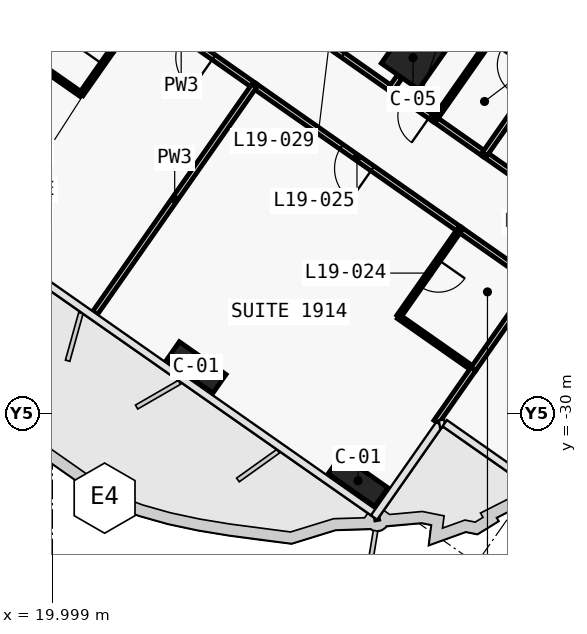
"""IFC4 building model, lengths in metres.
Left out: names, types, materials, properties, quantities, classifications, styles, units other than length and angle.
Written with IfcOpenShell. Run it as: python <this file> out.ifc"""

import sys

from ifc_helpers import new_model, si_unit, direction, frame, frame_2d, origin, origin_2d, place, context, subcontext, project, spatial, rectangle, extrude, element, fill, save


model = new_model("IFC4")
c1 = context("Model", 3, precision=1e-05, world=origin(), true_north=direction((0.0, 1.0)))
c2 = subcontext(c1, "Body", "Model", "MODEL_VIEW")
j1 = project(units=[si_unit("LENGTHUNIT", "METRE"), si_unit("PLANEANGLEUNIT", "RADIAN")], contexts=[c1])
p1 = place(None, origin())
s1 = spatial("IfcSite", under=j1, at=p1, CompositionType="ELEMENT")
p2 = place(p1, origin())
s2 = spatial("IfcBuilding", under=s1, at=p2, CompositionType="ELEMENT")
p3 = place(p2, frame((0.0, 0.0, 94.1)))
s3 = spatial("IfcBuildingStorey", under=s2, at=p3, CompositionType="ELEMENT", Elevation=94.1)
for number, where, z_axis, x_axis in (
    (1, (23.782, -28.799, 0.0), (0.0, 0.0, 1.0), (0.819, -0.574, 0.0)),
    (2, (28.042, -31.782, 0.0), (0.0, 0.0, 1.0), (0.819, -0.574, 0.0)),
):
    element("IfcColumn", number, at=place(p3, frame(where, z_axis=z_axis, x_axis=x_axis)), inside=s3, PredefinedType="COLUMN", context=c2, shape_type="SweptSolid", body=[
        extrude(rectangle(XDim=1.5, YDim=0.6, at=origin_2d()), origin(), (0.0, 0.0, 1.0), 3.6),
    ])
p4 = place(p3, frame((29.49, -20.649, 0.0), z_axis=(0.0, 0.0, 1.0), x_axis=(0.819152044289, -0.573576436351, 0.0)))
e3 = element("IfcColumn", 3, at=p4, inside=s3, PredefinedType="COLUMN", context=c2, shape_type="SweptSolid", body=[
    extrude(rectangle(XDim=1.2, YDim=1.2, at=origin_2d()), origin(), (0.0, 0.0, 1.0), 3.6),
])
p5 = place(p3, frame((26.457, -19.746, 0.0), z_axis=(0.0, 0.0, 1.0), x_axis=(0.81916700466, -0.573555070134, 0.0)))
e4 = element("IfcWall", 4, at=p5, inside=s3, PredefinedType="PARTITIONING", context=c2, shape_type="SweptSolid", body=[
    extrude(rectangle(XDim=3.004, YDim=0.15, at=frame_2d((1.502, 0.0))), origin(), (0.0, 0.0, 1.0), 2.6),
])
p6 = place(p5, frame((0.552, 0.0, 0.0)))
e5 = element("IfcOpeningElement", 5, at=p6, cuts=e4, PredefinedType="OPENING", context=c2, shape_type="SweptSolid", body=[
    extrude(rectangle(XDim=0.9, YDim=2.1, at=frame_2d((0.45, 1.05))), frame((0.0, 0.085, 0.0), z_axis=(0.0, -1.0, 0.0), x_axis=(1.0, 0.0, 0.0)), (0.0, 0.0, 1.0), 0.17),
])
p7 = place(p3, frame((30.063, -22.271, 0.0), z_axis=(0.0, 0.0, 1.0), x_axis=(-0.81914197737, 0.573590813132, 0.0)))
e6 = element("IfcWall", 6, at=p7, inside=s3, PredefinedType="PARTITIONING", context=c2, shape_type="SweptSolid", body=[
    extrude(rectangle(XDim=1.403, YDim=0.15, at=frame_2d((0.701, 0.0))), origin(), (0.0, 0.0, 1.0), 2.6),
])
p8 = place(p7, frame((0.15, 0.0, 0.0)))
e7 = element("IfcOpeningElement", 7, at=p8, cuts=e6, PredefinedType="OPENING", context=c2, shape_type="SweptSolid", body=[
    extrude(rectangle(XDim=0.85, YDim=2.1, at=frame_2d((0.425, 1.05))), frame((0.0, 0.085, 0.0), z_axis=(0.0, -1.0, 0.0), x_axis=(1.0, 0.0, 0.0)), (0.0, 0.0, 1.0), 0.17),
])
p9 = place(p3, frame((30.061, -22.27, 0.0), z_axis=(0.0, 0.0, 1.0), x_axis=(0.819189013667, -0.573523634986, 0.0)))
e8 = element("IfcWall", 8, at=p9, inside=s3, PredefinedType="PARTITIONING", context=c2, shape_type="SweptSolid", body=[
    extrude(rectangle(XDim=1.604, YDim=0.15, at=frame_2d((0.802, 0.0))), origin(), (0.0, 0.0, 1.0), 3.32),
])
p10 = place(p3, frame((31.372, -23.188, 0.0), z_axis=(0.0, 0.0, 1.0), x_axis=(0.819179439794, -0.573537309527, 0.0)))
e9 = element("IfcWall", 9, at=p10, inside=s3, PredefinedType="PARTITIONING", context=c2, shape_type="SweptSolid", body=[
    extrude(rectangle(XDim=2.404, YDim=0.15, at=frame_2d((1.202, 0.0))), origin(), (0.0, 0.0, 1.0), 3.32),
])
p11 = place(p3, frame((25.313, -21.387, 0.0), z_axis=(0.0, 0.0, 1.0), x_axis=(-0.819145961204, 0.573585123798, 0.0)))
e10 = element("IfcWall", 10, at=p11, inside=s3, PredefinedType="PARTITIONING", context=c2, shape_type="SweptSolid", body=[
    extrude(rectangle(XDim=3.603, YDim=0.15, at=frame_2d((1.802, 0.0))), origin(), (0.0, 0.0, 1.0), 3.32),
])
p12 = place(p11, frame((1.302, 0.0, 0.0)))
e11 = element("IfcOpeningElement", 11, at=p12, cuts=e10, PredefinedType="OPENING", context=c2, shape_type="SweptSolid", body=[
    extrude(rectangle(XDim=1.0, YDim=2.1, at=frame_2d((0.5, 1.05))), frame((0.0, 0.085, 0.0), z_axis=(0.0, -1.0, 0.0), x_axis=(1.0, 0.0, 0.0)), (0.0, 0.0, 1.0), 0.17),
])
p13 = place(p3, frame((30.719, -25.172, 0.0), z_axis=(0.0, 0.0, 1.0), x_axis=(-0.819153746897, 0.573574004767, 0.0)))
e12 = element("IfcWall", 12, at=p13, inside=s3, PredefinedType="PARTITIONING", context=c2, shape_type="SweptSolid", body=[
    extrude(rectangle(XDim=6.603, YDim=0.15, at=frame_2d((3.302, 0.0))), origin(), (0.0, 0.0, 1.0), 2.6),
])
p14 = place(p13, frame((2.801, 0.0, 0.0)))
e13 = element("IfcOpeningElement", 13, at=p14, cuts=e12, PredefinedType="OPENING", context=c2, shape_type="SweptSolid", body=[
    extrude(rectangle(XDim=1.0, YDim=2.1, at=frame_2d((0.5, 1.05))), frame((0.0, 0.085, 0.0), z_axis=(0.0, -1.0, 0.0), x_axis=(1.0, 0.0, 0.0)), (0.0, 0.0, 1.0), 0.17),
])
p15 = place(p3, frame((32.685, -26.549, 0.0), z_axis=(0.0, 0.0, 1.0), x_axis=(-0.819146032251, 0.573585022335, 0.0)))
e14 = element("IfcWall", 14, at=p15, inside=s3, PredefinedType="PARTITIONING", context=c2, shape_type="SweptSolid", body=[
    extrude(rectangle(XDim=2.404, YDim=0.15, at=frame_2d((1.202, 0.0))), origin(), (0.0, 0.0, 1.0), 3.32),
])
p16 = place(p3, frame((29.134, -21.156, 0.0), z_axis=(0.0, 0.0, 1.0), x_axis=(-0.572944929411, -0.819593867633, 0.0)))
e15 = element("IfcWall", 15, at=p16, inside=s3, PredefinedType="PARTITIONING", context=c2, shape_type="SweptSolid", body=[
    extrude(rectangle(XDim=0.38, YDim=0.15, at=frame_2d((0.19, 0.0))), origin(), (0.0, 0.0, 1.0), 2.6),
])
p17 = place(p3, frame((32.865, -21.058, 0.0), z_axis=(0.0, 0.0, 1.0), x_axis=(-0.819131543282, 0.57360571371, 0.0)))
e16 = element("IfcWall", 16, at=p17, inside=s3, PredefinedType="PARTITIONING", context=c2, shape_type="SweptSolid", body=[
    extrude(rectangle(XDim=1.6, YDim=0.12, at=frame_2d((0.8, 0.0))), origin(), (0.0, 0.0, 1.0), 3.32),
])
p18 = place(p17, frame((0.375, 0.0, 0.0)))
e17 = element("IfcOpeningElement", 17, at=p18, cuts=e16, PredefinedType="OPENING", context=c2, shape_type="SweptSolid", body=[
    extrude(rectangle(XDim=0.85, YDim=2.05, at=frame_2d((0.425, 1.025))), frame((0.0, 0.07, 0.0), z_axis=(0.0, -1.0, 0.0), x_axis=(1.0, 0.0, 0.0)), (0.0, 0.0, 1.0), 0.14),
])
p19 = place(p3, frame((31.553, -20.14, 0.0), z_axis=(0.0, 0.0, 1.0), x_axis=(-0.573537965655, -0.819178980414, 0.0)))
e18 = element("IfcWall", 18, at=p19, inside=s3, PredefinedType="PARTITIONING", context=c2, shape_type="SweptSolid", body=[
    extrude(rectangle(XDim=2.6, YDim=0.12, at=frame_2d((1.3, 0.0))), origin(), (0.0, 0.0, 1.0), 2.6),
])
p20 = place(p3, frame((32.865, -21.059, 0.0), z_axis=(0.0, 0.0, 1.0), x_axis=(-0.573600972199, -0.819134863556, 0.0)))
e19 = element("IfcWall", 19, at=p20, inside=s3, PredefinedType="PARTITIONING", context=c2, shape_type="SweptSolid", body=[
    extrude(rectangle(XDim=2.6, YDim=0.15, at=frame_2d((1.3, 0.0))), origin(), (0.0, 0.0, 1.0), 2.6),
])
p21 = place(p3, frame((18.79, -20.239, 0.0), z_axis=(0.0, 0.0, 1.0), x_axis=(0.819188907105, -0.573523787192, 0.0)))
e20 = element("IfcWall", 20, at=p21, inside=s3, PredefinedType="PARTITIONING", context=c2, shape_type="SweptSolid", body=[
    extrude(rectangle(XDim=2.4, YDim=0.12, at=frame_2d((1.2, 0.0))), origin(), (0.0, 0.0, 1.0), 2.6),
])
p22 = place(p3, frame((20.757, -21.615, 0.0), z_axis=(0.0, 0.0, 1.0), x_axis=(0.57364959175, 0.819100815459, 0.0)))
e21 = element("IfcWall", 21, at=p22, inside=s3, PredefinedType="PARTITIONING", context=c2, shape_type="SweptSolid", body=[
    extrude(rectangle(XDim=2.8, YDim=0.12, at=frame_2d((1.4, 0.0))), origin(), (0.0, 0.0, 1.0), 3.32),
])
p23 = place(p22, frame((0.975, 0.0, 0.0)))
e22 = element("IfcOpeningElement", 22, at=p23, cuts=e21, PredefinedType="OPENING", context=c2, shape_type="SweptSolid", body=[
    extrude(rectangle(XDim=0.85, YDim=2.05, at=frame_2d((0.425, 1.025))), frame((0.0, 0.07, 0.0), z_axis=(0.0, -1.0, 0.0), x_axis=(1.0, 0.0, 0.0)), (0.0, 0.0, 1.0), 0.14),
])
p24 = place(p3, frame((25.311, -21.385, 0.0), z_axis=(0.0, 0.0, 1.0), x_axis=(-0.573572324301, -0.819154923562, 0.0)))
e23 = element("IfcWall", 23, at=p24, inside=s3, PredefinedType="PARTITIONING", context=c2, shape_type="SweptSolid", body=[
    extrude(rectangle(XDim=7.3, YDim=0.15, at=frame_2d((3.65, 0.0))), origin(), (0.0, 0.0, 1.0), 2.5),
])
p25 = place(p3, frame((30.717, -25.17, 0.0), z_axis=(0.0, 0.0, 1.0), x_axis=(-0.573550118428, -0.819170471667, 0.0)))
e24 = element("IfcWall", 24, at=p25, inside=s3, PredefinedType="PARTITIONING", context=c2, shape_type="SweptSolid", body=[
    extrude(rectangle(XDim=2.8, YDim=0.12, at=frame_2d((1.4, 0.0))), origin(), (0.0, 0.0, 1.0), 3.32),
])
p26 = place(p25, frame((0.975, 0.0, 0.0)))
e25 = element("IfcOpeningElement", 25, at=p26, cuts=e24, PredefinedType="OPENING", context=c2, shape_type="SweptSolid", body=[
    extrude(rectangle(XDim=0.85, YDim=2.05, at=frame_2d((0.425, 1.025))), frame((0.0, 0.07, 0.0), z_axis=(0.0, -1.0, 0.0), x_axis=(1.0, 0.0, 0.0)), (0.0, 0.0, 1.0), 0.14),
])
p27 = place(p3, frame((29.111, -27.466, 0.0), z_axis=(0.0, 0.0, 1.0), x_axis=(0.819188907105, -0.573523787192, 0.0)))
e26 = element("IfcWall", 26, at=p27, inside=s3, PredefinedType="PARTITIONING", context=c2, shape_type="SweptSolid", body=[
    extrude(rectangle(XDim=2.4, YDim=0.12, at=frame_2d((1.2, 0.0))), origin(), (0.0, 0.0, 1.0), 3.32),
])
p28 = place(p3, frame((31.077, -28.842, 0.0), z_axis=(0.0, 0.0, 1.0), x_axis=(-0.573597175316, -0.819137522318, 0.0)))
e27 = element("IfcWall", 27, at=p28, inside=s3, PredefinedType="PARTITIONING", context=c2, shape_type="SweptSolid", body=[
    extrude(rectangle(XDim=1.701, YDim=0.15, at=frame_2d((0.851, 0.0))), origin(), (0.0, 0.0, 1.0), 3.32),
])
p29 = place(p3, frame((32.684, -26.548, 0.0), z_axis=(0.0, 0.0, 1.0), x_axis=(-0.573550118428, -0.819170471667, 0.0)))
e28 = element("IfcWall", 28, at=p29, inside=s3, PredefinedType="PARTITIONING", context=c2, shape_type="SweptSolid", body=[
    extrude(rectangle(XDim=2.8, YDim=0.15, at=frame_2d((1.4, 0.0))), origin(), (0.0, 0.0, 1.0), 3.32),
])
p30 = place(p23, origin())
e29 = element("IfcDoor", 29, at=p30, inside=s3, OperationType="SINGLE_SWING_RIGHT", PredefinedType="DOOR", context=c2, shape_type="SweptSolid", body=[
    extrude(rectangle(XDim=0.85, YDim=2.05, at=frame_2d((0.425, 1.025))), frame((0.0, 0.025, 0.0), z_axis=(0.0, -1.0, 0.0), x_axis=(1.0, 0.0, 0.0)), (0.0, 0.0, 1.0), 0.05),
])
fill(e22, e29)
p31 = place(p12, origin())
e30 = element("IfcDoor", 30, at=p31, inside=s3, OperationType="SINGLE_SWING_LEFT", PredefinedType="DOOR", context=c2, shape_type="SweptSolid", body=[
    extrude(rectangle(XDim=1.0, YDim=2.1, at=frame_2d((0.5, 1.05))), frame((0.0, 0.025, 0.0), z_axis=(0.0, -1.0, 0.0), x_axis=(1.0, 0.0, 0.0)), (0.0, 0.0, 1.0), 0.05),
])
fill(e11, e30)
p32 = place(p26, origin())
e31 = element("IfcDoor", 31, at=p32, inside=s3, OperationType="SINGLE_SWING_RIGHT", PredefinedType="DOOR", context=c2, shape_type="SweptSolid", body=[
    extrude(rectangle(XDim=0.85, YDim=2.05, at=frame_2d((0.425, 1.025))), frame((0.0, 0.025, 0.0), z_axis=(0.0, -1.0, 0.0), x_axis=(1.0, 0.0, 0.0)), (0.0, 0.0, 1.0), 0.05),
])
fill(e25, e31)
p33 = place(p14, origin())
e32 = element("IfcDoor", 32, at=p33, inside=s3, OperationType="SINGLE_SWING_RIGHT", PredefinedType="DOOR", context=c2, shape_type="SweptSolid", body=[
    extrude(rectangle(XDim=1.0, YDim=2.1, at=frame_2d((0.5, 1.05))), frame((0.0, 0.025, 0.0), z_axis=(0.0, -1.0, 0.0), x_axis=(1.0, 0.0, 0.0)), (0.0, 0.0, 1.0), 0.05),
])
fill(e13, e32)
p34 = place(p6, origin())
e33 = element("IfcDoor", 33, at=p34, inside=s3, OperationType="SINGLE_SWING_LEFT", PredefinedType="DOOR", context=c2, shape_type="SweptSolid", body=[
    extrude(rectangle(XDim=0.9, YDim=2.1, at=frame_2d((0.45, 1.05))), frame((0.0, 0.025, 0.0), z_axis=(0.0, -1.0, 0.0), x_axis=(1.0, 0.0, 0.0)), (0.0, 0.0, 1.0), 0.05),
])
fill(e5, e33)
p35 = place(p18, origin())
e34 = element("IfcDoor", 34, at=p35, inside=s3, OperationType="SINGLE_SWING_RIGHT", PredefinedType="DOOR", context=c2, shape_type="SweptSolid", body=[
    extrude(rectangle(XDim=0.85, YDim=2.05, at=frame_2d((0.425, 1.025))), frame((0.0, 0.025, 0.0), z_axis=(0.0, -1.0, 0.0), x_axis=(1.0, 0.0, 0.0)), (0.0, 0.0, 1.0), 0.05),
])
fill(e17, e34)
p36 = place(p8, origin())
e35 = element("IfcDoor", 35, at=p36, inside=s3, OperationType="SINGLE_SWING_RIGHT", PredefinedType="DOOR", context=c2, shape_type="SweptSolid", body=[
    extrude(rectangle(XDim=0.85, YDim=2.1, at=frame_2d((0.425, 1.05))), frame((0.0, 0.025, 0.0), z_axis=(0.0, -1.0, 0.0), x_axis=(1.0, 0.0, 0.0)), (0.0, 0.0, 1.0), 0.05),
])
fill(e7, e35)
save(model, sys.argv[1])
